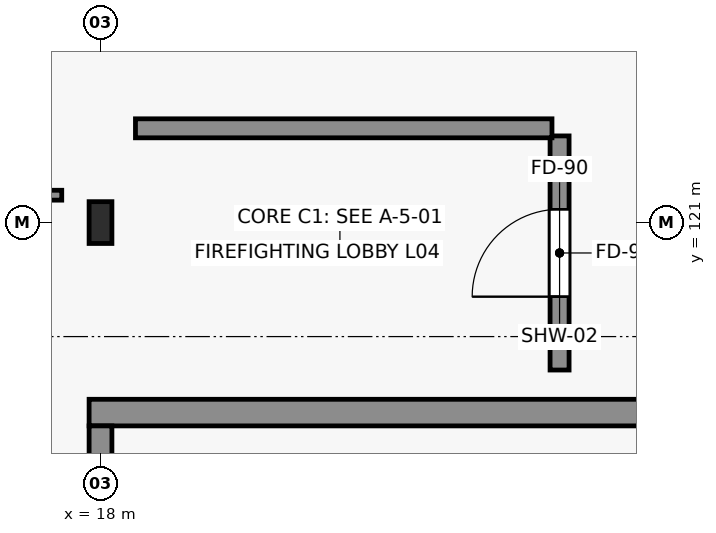
"""IFC4 building model, lengths in metres.
Left out: names, types, materials, properties, quantities, classifications, styles, units other than length and angle.
Written with IfcOpenShell. Run it as: python <this file> out.ifc"""

import sys

from ifc_helpers import new_model, si_unit, direction, frame, frame_2d, origin, origin_2d, place, context, subcontext, project, spatial, rectangle, i_section, extrude, element, fill, save


model = new_model("IFC4")
c1 = context("Model", 3, precision=1e-05, world=origin(), true_north=direction((0.0, 1.0)))
c2 = subcontext(c1, "Body", "Model", "MODEL_VIEW")
j1 = project(units=[si_unit("LENGTHUNIT", "METRE"), si_unit("PLANEANGLEUNIT", "RADIAN")], contexts=[c1])
p1 = place(None, origin())
s1 = spatial("IfcSite", under=j1, at=p1, CompositionType="ELEMENT")
p2 = place(p1, origin())
s2 = spatial("IfcBuilding", under=s1, at=p2, CompositionType="ELEMENT")
p3 = place(p2, frame((0.0, 0.0, 19.5)))
s3 = spatial("IfcBuildingStorey", under=s2, at=p3, CompositionType="ELEMENT", Elevation=19.5)
p4 = place(p3, frame((18.0, 121.0, 0.0), z_axis=(0.0, 0.0, 1.0), x_axis=(1.0, 0.0, 0.0)))
e1 = element("IfcColumn", 1, at=p4, inside=s3, PredefinedType="COLUMN", context=c2, shape_type="SweptSolid", body=[
    extrude(i_section(OverallWidth=0.3, OverallDepth=0.55, WebThickness=0.015, FlangeThickness=0.029, FilletRadius=0.027, at=origin_2d()), origin(), (0.0, 0.0, 1.0), 4.275),
])
p5 = place(p3, frame((17.85, 118.5, 0.0), z_axis=(0.0, 0.0, 1.0), x_axis=(1.0, 0.0, 0.0)))
e2 = element("IfcWall", 2, at=p5, inside=s3, PredefinedType="SHEAR", context=c2, shape_type="SweptSolid", body=[
    extrude(rectangle(XDim=9.3, YDim=0.35, at=frame_2d((4.65, 0.0))), origin(), (0.0, 0.0, 1.0), 4.275),
])
p6 = place(p3, frame((18.0, 113.5, 0.0), z_axis=(0.0, 0.0, 1.0), x_axis=(0.0, 1.0, 0.0)))
e3 = element("IfcWall", 3, at=p6, inside=s3, PredefinedType="SHEAR", context=c2, shape_type="SweptSolid", body=[
    extrude(rectangle(XDim=4.825, YDim=0.3, at=frame_2d((2.413, 0.0))), origin(), (0.0, 0.0, 1.0), 4.275),
])
p7 = place(p3, frame((17.49, 121.36, 0.0), z_axis=(0.0, 0.0, 1.0), x_axis=(-1.0, 0.0, 0.0)))
e4 = element("IfcWall", 4, at=p7, inside=s3, PredefinedType="PARTITIONING", context=c2, shape_type="SweptSolid", body=[
    extrude(rectangle(XDim=16.68, YDim=0.13, at=frame_2d((8.34, 0.0))), origin(), (0.0, 0.0, 1.0), 3.695),
])
p8 = place(p7, frame((5.526, 0.0, 0.0)))
e5 = element("IfcOpeningElement", 5, at=p8, cuts=e4, PredefinedType="OPENING", context=c2, shape_type="SweptSolid", body=[
    extrude(rectangle(XDim=1.08, YDim=2.18, at=frame_2d((0.54, 1.09))), frame((0.0, 0.075, 0.0), z_axis=(0.0, -1.0, 0.0), x_axis=(1.0, 0.0, 0.0)), (0.0, 0.0, 1.0), 0.15),
])
p9 = place(p3, frame((24.04, 119.06, 0.0), z_axis=(0.0, 0.0, 1.0), x_axis=(0.0, 1.0, 0.0)))
e6 = element("IfcWall", 6, at=p9, inside=s3, PredefinedType="SOLIDWALL", context=c2, shape_type="SweptSolid", body=[
    extrude(rectangle(XDim=3.08, YDim=0.25, at=frame_2d((1.54, 0.0))), origin(), (0.0, 0.0, 1.0), 3.695),
])
p10 = place(p9, frame((0.965, 0.0, 0.0)))
e7 = element("IfcOpeningElement", 7, at=p10, cuts=e6, PredefinedType="OPENING", context=c2, shape_type="SweptSolid", body=[
    extrude(rectangle(XDim=1.15, YDim=2.2, at=frame_2d((0.575, 1.1))), frame((0.0, 0.135, 0.0), z_axis=(0.0, -1.0, 0.0), x_axis=(1.0, 0.0, 0.0)), (0.0, 0.0, 1.0), 0.27),
])
p11 = place(p3, frame((18.46, 122.24, 0.0), z_axis=(0.0, 0.0, 1.0), x_axis=(1.0, 0.0, 0.0)))
e8 = element("IfcWall", 8, at=p11, inside=s3, PredefinedType="SOLIDWALL", context=c2, shape_type="SweptSolid", body=[
    extrude(rectangle(XDim=5.48, YDim=0.25, at=frame_2d((2.74, 0.0))), origin(), (0.0, 0.0, 1.0), 4.025),
])
p12 = place(p10, origin())
e9 = element("IfcDoor", 9, at=p12, inside=s3, OperationType="SINGLE_SWING_LEFT", PredefinedType="DOOR", context=c2, shape_type="SweptSolid", body=[
    extrude(rectangle(XDim=1.15, YDim=2.2, at=frame_2d((0.575, 1.1))), frame((0.0, 0.025, 0.0), z_axis=(0.0, -1.0, 0.0), x_axis=(1.0, 0.0, 0.0)), (0.0, 0.0, 1.0), 0.05),
])
fill(e7, e9)
save(model, sys.argv[1])
